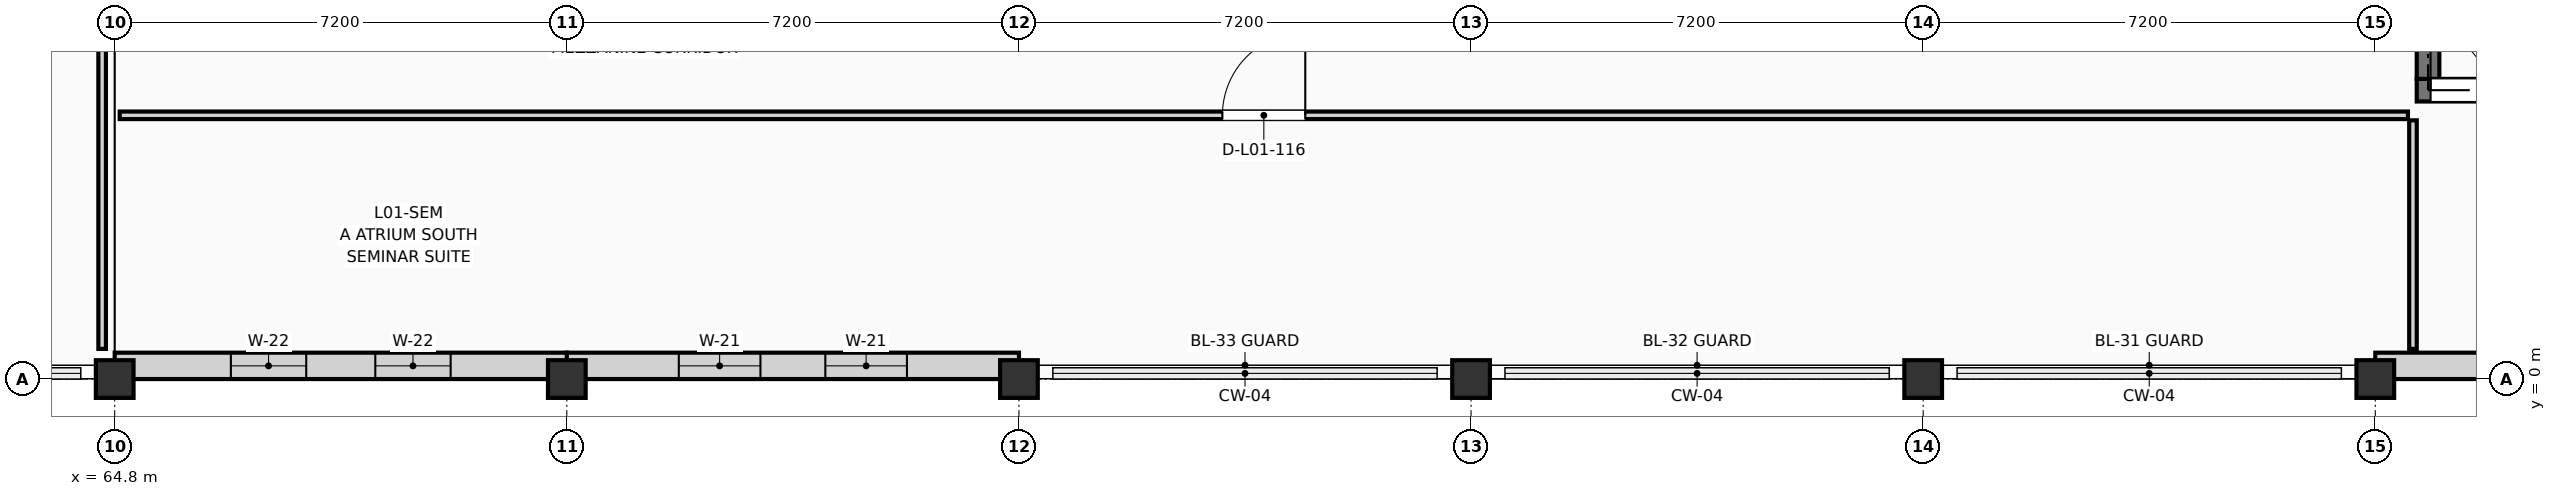
"""IFC4 building model, lengths in metres.
Left out: names, types, materials, properties, quantities, classifications, styles, units other than length and angle.
Written with IfcOpenShell. Run it as: python <this file> out.ifc"""

import sys

from ifc_helpers import new_model, si_unit, direction, frame, frame_2d, origin, origin_2d, place, context, subcontext, project, spatial, rectangle, extrude, element, fill, save


model = new_model("IFC4")
c1 = context("Model", 3, precision=1e-05, world=origin(), true_north=direction((0.0, 1.0)))
c2 = subcontext(c1, "Body", "Model", "MODEL_VIEW")
j1 = project(units=[si_unit("LENGTHUNIT", "METRE"), si_unit("PLANEANGLEUNIT", "RADIAN")], contexts=[c1])
p1 = place(None, origin())
s1 = spatial("IfcSite", under=j1, at=p1, CompositionType="ELEMENT")
p2 = place(p1, origin())
s2 = spatial("IfcBuilding", under=s1, at=p2, CompositionType="ELEMENT")
p3 = place(p2, frame((0.0, 0.0, 4.5)))
s3 = spatial("IfcBuildingStorey", under=s2, at=p3, CompositionType="ELEMENT", Elevation=4.5)
for number, where, z_axis, x_axis in (
    (1, (64.8, 0.0, 0.0), (0.0, 0.0, 1.0), (1.0, 0.0, 0.0)),
    (2, (72.0, 0.0, 0.0), (0.0, 0.0, 1.0), (1.0, 0.0, 0.0)),
    (3, (79.2, 0.0, 0.0), (0.0, 0.0, 1.0), (1.0, 0.0, 0.0)),
    (4, (86.4, 0.0, 0.0), (0.0, 0.0, 1.0), (1.0, 0.0, 0.0)),
    (5, (93.6, 0.0, 0.0), (0.0, 0.0, 1.0), (1.0, 0.0, 0.0)),
    (6, (100.8, 0.0, 0.0), (0.0, 0.0, 1.0), (1.0, 0.0, 0.0)),
):
    element("IfcColumn", number, at=place(p3, frame(where, z_axis=z_axis, x_axis=x_axis)), inside=s3, PredefinedType="COLUMN", context=c2, shape_type="SweptSolid", body=[
        extrude(rectangle(XDim=0.6, YDim=0.6, at=origin_2d()), origin(), (0.0, 0.0, 1.0), 4.05),
    ])
p4 = place(p3, frame((100.8, 0.21, 0.0), z_axis=(0.0, 0.0, 1.0), x_axis=(1.0, 0.0, 0.0)))
e7 = element("IfcWall", 7, at=p4, inside=s3, PredefinedType="SOLIDWALL", context=c2, shape_type="SweptSolid", body=[
    extrude(rectangle(XDim=7.2, YDim=0.42, at=frame_2d((3.6, 0.0))), origin(), (0.0, 0.0, 1.0), 3.16),
])
p5 = place(p4, frame((1.717, 0.0, 0.45)))
e8 = element("IfcOpeningElement", 8, at=p5, cuts=e7, PredefinedType="OPENING", context=c2, shape_type="SweptSolid", body=[
    extrude(rectangle(XDim=1.4, YDim=2.38, at=frame_2d((0.7, 1.19))), frame((0.0, 0.222, 0.0), z_axis=(0.0, -1.0, 0.0), x_axis=(1.0, 0.0, 0.0)), (0.0, 0.0, 1.0), 0.444),
])
p6 = place(p4, frame((4.083, 0.0, 0.45)))
e9 = element("IfcOpeningElement", 9, at=p6, cuts=e7, PredefinedType="OPENING", context=c2, shape_type="SweptSolid", body=[
    extrude(rectangle(XDim=1.4, YDim=2.38, at=frame_2d((0.7, 1.19))), frame((0.0, 0.222, 0.0), z_axis=(0.0, -1.0, 0.0), x_axis=(1.0, 0.0, 0.0)), (0.0, 0.0, 1.0), 0.444),
])
p7 = place(p3, frame((72.0, 0.21, 0.0), z_axis=(0.0, 0.0, 1.0), x_axis=(1.0, 0.0, 0.0)))
e10 = element("IfcWall", 10, at=p7, inside=s3, PredefinedType="SOLIDWALL", context=c2, shape_type="SweptSolid", body=[
    extrude(rectangle(XDim=7.2, YDim=0.42, at=frame_2d((3.6, 0.0))), origin(), (0.0, 0.0, 1.0), 3.16),
])
p8 = place(p7, frame((1.783, 0.0, 0.45)))
e11 = element("IfcOpeningElement", 11, at=p8, cuts=e10, PredefinedType="OPENING", context=c2, shape_type="SweptSolid", body=[
    extrude(rectangle(XDim=1.3, YDim=2.35, at=frame_2d((0.65, 1.175))), frame((0.0, 0.222, 0.0), z_axis=(0.0, -1.0, 0.0), x_axis=(1.0, 0.0, 0.0)), (0.0, 0.0, 1.0), 0.444),
])
p9 = place(p7, frame((4.117, 0.0, 0.45)))
e12 = element("IfcOpeningElement", 12, at=p9, cuts=e10, PredefinedType="OPENING", context=c2, shape_type="SweptSolid", body=[
    extrude(rectangle(XDim=1.3, YDim=2.35, at=frame_2d((0.65, 1.175))), frame((0.0, 0.222, 0.0), z_axis=(0.0, -1.0, 0.0), x_axis=(1.0, 0.0, 0.0)), (0.0, 0.0, 1.0), 0.444),
])
p10 = place(p3, frame((64.8, 0.21, 0.0), z_axis=(0.0, 0.0, 1.0), x_axis=(1.0, 0.0, 0.0)))
e13 = element("IfcWall", 13, at=p10, inside=s3, PredefinedType="SOLIDWALL", context=c2, shape_type="SweptSolid", body=[
    extrude(rectangle(XDim=7.2, YDim=0.42, at=frame_2d((3.6, 0.0))), origin(), (0.0, 0.0, 1.0), 3.16),
])
p11 = place(p10, frame((1.85, 0.0, 0.45)))
e14 = element("IfcOpeningElement", 14, at=p11, cuts=e13, PredefinedType="OPENING", context=c2, shape_type="SweptSolid", body=[
    extrude(rectangle(XDim=1.2, YDim=2.35, at=frame_2d((0.6, 1.175))), frame((0.0, 0.222, 0.0), z_axis=(0.0, -1.0, 0.0), x_axis=(1.0, 0.0, 0.0)), (0.0, 0.0, 1.0), 0.444),
])
p12 = place(p10, frame((4.15, 0.0, 0.45)))
e15 = element("IfcOpeningElement", 15, at=p12, cuts=e13, PredefinedType="OPENING", context=c2, shape_type="SweptSolid", body=[
    extrude(rectangle(XDim=1.2, YDim=2.35, at=frame_2d((0.6, 1.175))), frame((0.0, 0.222, 0.0), z_axis=(0.0, -1.0, 0.0), x_axis=(1.0, 0.0, 0.0)), (0.0, 0.0, 1.0), 0.444),
])
p13 = place(p3, frame((101.46, 4.6, 0.0), z_axis=(0.0, 0.0, 1.0), x_axis=(1.0, 0.0, 0.0)))
e16 = element("IfcWall", 16, at=p13, inside=s3, PredefinedType="SHEAR", context=c2, shape_type="SweptSolid", body=[
    extrude(rectangle(XDim=5.88, YDim=0.36, at=frame_2d((2.94, 0.0))), origin(), (0.0, 0.0, 1.0), 3.79),
])
p14 = place(p13, frame((0.22, 0.0, 0.0)))
e17 = element("IfcOpeningElement", 17, at=p14, cuts=e16, PredefinedType="OPENING", context=c2, shape_type="SweptSolid", body=[
    extrude(rectangle(XDim=1.8, YDim=2.2, at=frame_2d((0.9, 1.1))), frame((0.0, 0.192, 0.0), z_axis=(0.0, -1.0, 0.0), x_axis=(1.0, 0.0, 0.0)), (0.0, 0.0, 1.0), 0.384),
])
p15 = place(p3, frame((101.64, 4.78, 0.0), z_axis=(0.0, 0.0, 1.0), x_axis=(0.0, 1.0, 0.0)))
e18 = element("IfcWall", 18, at=p15, inside=s3, PredefinedType="SHEAR", context=c2, shape_type="SweptSolid", body=[
    extrude(rectangle(XDim=8.59, YDim=0.36, at=frame_2d((4.295, 0.0))), origin(), (0.0, 0.0, 1.0), 3.79),
])
p16 = place(p3, frame((64.6, 0.48, 0.0), z_axis=(0.0, 0.0, 1.0), x_axis=(0.0, 1.0, 0.0)))
e19 = element("IfcWall", 19, at=p16, inside=s3, PredefinedType="PARTITIONING", context=c2, shape_type="SweptSolid", body=[
    extrude(rectangle(XDim=6.24, YDim=0.12, at=frame_2d((3.12, 0.0))), origin(), (0.0, 0.0, 1.0), 2.925),
])
p17 = place(p3, frame((101.4, 0.48, 0.0), z_axis=(0.0, 0.0, 1.0), x_axis=(0.0, 1.0, 0.0)))
e20 = element("IfcWall", 20, at=p17, inside=s3, PredefinedType="PARTITIONING", context=c2, shape_type="SweptSolid", body=[
    extrude(rectangle(XDim=3.64, YDim=0.12, at=frame_2d((1.82, 0.0))), origin(), (0.0, 0.0, 1.0), 3.775),
])
p18 = place(p3, frame((64.88, 4.2, 0.0), z_axis=(0.0, 0.0, 1.0), x_axis=(1.0, 0.0, 0.0)))
e21 = element("IfcWall", 21, at=p18, inside=s3, PredefinedType="PARTITIONING", context=c2, shape_type="SweptSolid", body=[
    extrude(rectangle(XDim=36.44, YDim=0.12, at=frame_2d((18.22, 0.0))), origin(), (0.0, 0.0, 1.0), 3.775),
])
p19 = place(p18, frame((17.56, 0.0, 0.0)))
e22 = element("IfcOpeningElement", 22, at=p19, cuts=e21, PredefinedType="OPENING", context=c2, shape_type="SweptSolid", body=[
    extrude(rectangle(XDim=1.32, YDim=2.2, at=frame_2d((0.66, 1.1))), frame((0.0, 0.072, 0.0), z_axis=(0.0, -1.0, 0.0), x_axis=(1.0, 0.0, 0.0)), (0.0, 0.0, 1.0), 0.144),
])
p20 = place(p8, origin())
e23 = element("IfcWindow", 23, at=p20, inside=s3, PartitioningType="SINGLE_PANEL", PredefinedType="WINDOW", context=c2, shape_type="SweptSolid", body=[
    extrude(rectangle(XDim=1.3, YDim=2.35, at=frame_2d((0.65, 1.175))), frame((0.0, 0.03, 0.0), z_axis=(0.0, -1.0, 0.0), x_axis=(1.0, 0.0, 0.0)), (0.0, 0.0, 1.0), 0.06),
])
fill(e11, e23)
p21 = place(p9, origin())
e24 = element("IfcWindow", 24, at=p21, inside=s3, PartitioningType="SINGLE_PANEL", PredefinedType="WINDOW", context=c2, shape_type="SweptSolid", body=[
    extrude(rectangle(XDim=1.3, YDim=2.35, at=frame_2d((0.65, 1.175))), frame((0.0, 0.03, 0.0), z_axis=(0.0, -1.0, 0.0), x_axis=(1.0, 0.0, 0.0)), (0.0, 0.0, 1.0), 0.06),
])
fill(e12, e24)
p22 = place(p11, origin())
e25 = element("IfcWindow", 25, at=p22, inside=s3, PartitioningType="SINGLE_PANEL", PredefinedType="WINDOW", context=c2, shape_type="SweptSolid", body=[
    extrude(rectangle(XDim=1.2, YDim=2.35, at=frame_2d((0.6, 1.175))), frame((0.0, 0.03, 0.0), z_axis=(0.0, -1.0, 0.0), x_axis=(1.0, 0.0, 0.0)), (0.0, 0.0, 1.0), 0.06),
])
fill(e14, e25)
p23 = place(p12, origin())
e26 = element("IfcWindow", 26, at=p23, inside=s3, PartitioningType="SINGLE_PANEL", PredefinedType="WINDOW", context=c2, shape_type="SweptSolid", body=[
    extrude(rectangle(XDim=1.2, YDim=2.35, at=frame_2d((0.6, 1.175))), frame((0.0, 0.03, 0.0), z_axis=(0.0, -1.0, 0.0), x_axis=(1.0, 0.0, 0.0)), (0.0, 0.0, 1.0), 0.06),
])
fill(e15, e26)
p24 = place(p14, origin())
e27 = element("IfcDoor", 27, at=p24, inside=s3, OperationType="DOUBLE_DOOR_SINGLE_SWING", PredefinedType="DOOR", context=c2, shape_type="SweptSolid", body=[
    extrude(rectangle(XDim=1.8, YDim=2.2, at=frame_2d((0.9, 1.1))), frame((0.0, 0.025, 0.0), z_axis=(0.0, -1.0, 0.0), x_axis=(1.0, 0.0, 0.0)), (0.0, 0.0, 1.0), 0.05),
])
fill(e17, e27)
p25 = place(p19, origin())
e28 = element("IfcDoor", 28, at=p25, inside=s3, OperationType="SINGLE_SWING_RIGHT", PredefinedType="DOOR", context=c2, shape_type="SweptSolid", body=[
    extrude(rectangle(XDim=1.32, YDim=2.2, at=frame_2d((0.66, 1.1))), frame((0.0, 0.025, 0.0), z_axis=(0.0, -1.0, 0.0), x_axis=(1.0, 0.0, 0.0)), (0.0, 0.0, 1.0), 0.05),
])
fill(e22, e28)
save(model, sys.argv[1])
